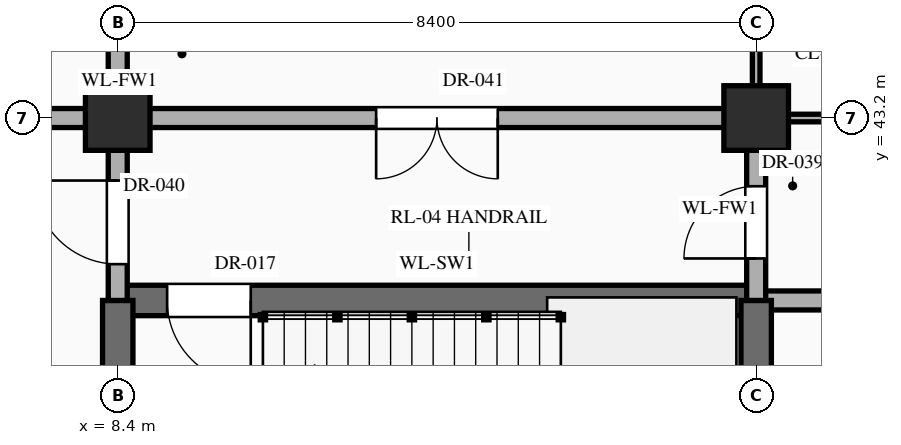
"""IFC4 building model, lengths in metres.
Left out: names, types, materials, properties, quantities, classifications, styles, units other than length and angle.
Written with IfcOpenShell. Run it as: python <this file> out.ifc"""

import sys

from ifc_helpers import new_model, si_unit, direction, frame, frame_2d, origin, origin_2d, place, context, subcontext, project, spatial, rectangle, extrude, element, fill, save


model = new_model("IFC4")
c1 = context("Model", 3, precision=1e-05, world=origin(), true_north=direction((0.0, 1.0)))
c2 = subcontext(c1, "Body", "Model", "MODEL_VIEW")
j1 = project(units=[si_unit("LENGTHUNIT", "METRE"), si_unit("PLANEANGLEUNIT", "RADIAN")], contexts=[c1])
p1 = place(None, origin())
s1 = spatial("IfcSite", under=j1, at=p1, CompositionType="ELEMENT")
p2 = place(p1, origin())
s2 = spatial("IfcBuilding", under=s1, at=p2, CompositionType="ELEMENT")
p3 = place(p2, frame((0.0, 0.0, -10.2)))
s3 = spatial("IfcBuildingStorey", under=s2, at=p3, CompositionType="ELEMENT", Elevation=-10.2)
for number, where, z_axis, x_axis in (
    (1, (8.4, 43.2, 0.0), (0.0, 0.0, 1.0), (1.0, 0.0, 0.0)),
    (2, (16.8, 43.2, 0.0), (0.0, 0.0, 1.0), (1.0, 0.0, 0.0)),
):
    element("IfcColumn", number, at=place(p3, frame(where, z_axis=z_axis, x_axis=x_axis)), inside=s3, PredefinedType="COLUMN", context=c2, shape_type="SweptSolid", body=[
        extrude(rectangle(XDim=0.85, YDim=0.85, at=origin_2d()), origin(), (0.0, 0.0, 1.0), 4.8),
    ])
p4 = place(p3, frame((8.4, 40.8, 0.0), z_axis=(0.0, 0.0, 1.0), x_axis=(1.0, 0.0, 0.0)))
e3 = element("IfcWall", 3, at=p4, inside=s3, PredefinedType="SHEAR", context=c2, shape_type="SweptSolid", body=[
    extrude(rectangle(XDim=8.4, YDim=0.4, at=frame_2d((4.2, 0.0))), origin(), (0.0, 0.0, 1.0), 4.48),
])
p5 = place(p4, frame((0.65, 0.0, 0.0)))
e4 = element("IfcOpeningElement", 4, at=p5, cuts=e3, PredefinedType="OPENING", context=c2, shape_type="SweptSolid", body=[
    extrude(rectangle(XDim=1.1, YDim=2.2, at=frame_2d((0.55, 1.1))), frame((0.0, 0.212, 0.0), z_axis=(0.0, -1.0, 0.0), x_axis=(1.0, 0.0, 0.0)), (0.0, 0.0, 1.0), 0.424),
])
p6 = place(p3, frame((16.8, 40.8, 0.0), z_axis=(0.0, 0.0, 1.0), x_axis=(1.0, 0.0, 0.0)))
e5 = element("IfcWall", 5, at=p6, inside=s3, PredefinedType="STANDARD", context=c2, shape_type="SweptSolid", body=[
    extrude(rectangle(XDim=61.6, YDim=0.25, at=frame_2d((30.8, 0.0))), origin(), (0.0, 0.0, 1.0), 4.48),
])
p7 = place(p6, frame((30.25, 0.0, 0.0)))
e6 = element("IfcOpeningElement", 6, at=p7, cuts=e5, PredefinedType="OPENING", context=c2, shape_type="SweptSolid", body=[
    extrude(rectangle(XDim=1.1, YDim=2.2, at=frame_2d((0.55, 1.1))), frame((0.0, 0.137, 0.0), z_axis=(0.0, -1.0, 0.0), x_axis=(1.0, 0.0, 0.0)), (0.0, 0.0, 1.0), 0.274),
])
p8 = place(p3, frame((0.04, 43.2, 0.0), z_axis=(0.0, 0.0, 1.0), x_axis=(1.0, 0.0, 0.0)))
e7 = element("IfcWall", 7, at=p8, inside=s3, PredefinedType="STANDARD", context=c2, shape_type="SweptSolid", body=[
    extrude(rectangle(XDim=16.76, YDim=0.25, at=frame_2d((8.38, 0.0))), origin(), (0.0, 0.0, 1.0), 3.63),
])
p9 = place(p8, frame((11.76, 0.0, 0.0)))
e8 = element("IfcOpeningElement", 8, at=p9, cuts=e7, PredefinedType="OPENING", context=c2, shape_type="SweptSolid", body=[
    extrude(rectangle(XDim=1.6, YDim=2.3, at=frame_2d((0.8, 1.15))), frame((0.0, 0.137, 0.0), z_axis=(0.0, -1.0, 0.0), x_axis=(1.0, 0.0, 0.0)), (0.0, 0.0, 1.0), 0.274),
])
p10 = place(p3, frame((16.8, 43.2, 0.0), z_axis=(0.0, 0.0, 1.0), x_axis=(1.0, 0.0, 0.0)))
e9 = element("IfcWall", 9, at=p10, inside=s3, PredefinedType="STANDARD", context=c2, shape_type="SweptSolid", body=[
    extrude(rectangle(XDim=33.6, YDim=0.1, at=frame_2d((16.8, 0.0))), origin(), (0.0, 0.0, 1.0), 3.63),
])
p11 = place(p10, frame((12.14, 0.0, 0.0)))
e10 = element("IfcOpeningElement", 10, at=p11, cuts=e9, PredefinedType="OPENING", context=c2, shape_type="SweptSolid", body=[
    extrude(rectangle(XDim=0.92, YDim=2.15, at=frame_2d((0.46, 1.075))), frame((0.0, 0.062, 0.0), z_axis=(0.0, -1.0, 0.0), x_axis=(1.0, 0.0, 0.0)), (0.0, 0.0, 1.0), 0.124),
])
p12 = place(p3, frame((8.4, 36.0, 0.0), z_axis=(0.0, 0.0, 1.0), x_axis=(0.0, 1.0, 0.0)))
e11 = element("IfcWall", 11, at=p12, inside=s3, PredefinedType="SHEAR", context=c2, shape_type="SweptSolid", body=[
    extrude(rectangle(XDim=4.8, YDim=0.4, at=frame_2d((2.4, 0.0))), origin(), (0.0, 0.0, 1.0), 4.48),
])
p13 = place(p3, frame((8.4, 40.8, 0.0), z_axis=(0.0, 0.0, 1.0), x_axis=(0.0, 1.0, 0.0)))
e12 = element("IfcWall", 12, at=p13, inside=s3, PredefinedType="STANDARD", context=c2, shape_type="SweptSolid", body=[
    extrude(rectangle(XDim=43.2, YDim=0.25, at=frame_2d((21.6, 0.0))), origin(), (0.0, 0.0, 1.0), 3.73),
])
p14 = place(p13, frame((0.478, 0.0, 0.0)))
e13 = element("IfcOpeningElement", 13, at=p14, cuts=e12, PredefinedType="OPENING", context=c2, shape_type="SweptSolid", body=[
    extrude(rectangle(XDim=1.1, YDim=2.2, at=frame_2d((0.55, 1.1))), frame((0.0, 0.137, 0.0), z_axis=(0.0, -1.0, 0.0), x_axis=(1.0, 0.0, 0.0)), (0.0, 0.0, 1.0), 0.274),
])
p15 = place(p13, frame((27.05, 0.0, 0.0)))
e14 = element("IfcOpeningElement", 14, at=p15, cuts=e12, PredefinedType="OPENING", context=c2, shape_type="SweptSolid", body=[
    extrude(rectangle(XDim=1.1, YDim=2.2, at=frame_2d((0.55, 1.1))), frame((0.0, 0.137, 0.0), z_axis=(0.0, -1.0, 0.0), x_axis=(1.0, 0.0, 0.0)), (0.0, 0.0, 1.0), 0.274),
])
p16 = place(p3, frame((16.8, 36.0, 0.0), z_axis=(0.0, 0.0, 1.0), x_axis=(0.0, 1.0, 0.0)))
e15 = element("IfcWall", 15, at=p16, inside=s3, PredefinedType="SHEAR", context=c2, shape_type="SweptSolid", body=[
    extrude(rectangle(XDim=4.8, YDim=0.4, at=frame_2d((2.4, 0.0))), origin(), (0.0, 0.0, 1.0), 4.48),
])
p17 = place(p3, frame((16.8, 40.8, 0.0), z_axis=(0.0, 0.0, 1.0), x_axis=(0.0, 1.0, 0.0)))
e16 = element("IfcWall", 16, at=p17, inside=s3, PredefinedType="STANDARD", context=c2, shape_type="SweptSolid", body=[
    extrude(rectangle(XDim=2.4, YDim=0.25, at=frame_2d((1.2, 0.0))), origin(), (0.0, 0.0, 1.0), 3.73),
])
p18 = place(p17, frame((0.552, 0.0, 0.0)))
e17 = element("IfcOpeningElement", 17, at=p18, cuts=e16, PredefinedType="OPENING", context=c2, shape_type="SweptSolid", body=[
    extrude(rectangle(XDim=0.95, YDim=2.15, at=frame_2d((0.475, 1.075))), frame((0.0, 0.137, 0.0), z_axis=(0.0, -1.0, 0.0), x_axis=(1.0, 0.0, 0.0)), (0.0, 0.0, 1.0), 0.274),
])
p19 = place(p3, frame((16.8, 43.2, 0.0), z_axis=(0.0, 0.0, 1.0), x_axis=(0.0, 1.0, 0.0)))
e18 = element("IfcWall", 18, at=p19, inside=s3, PredefinedType="STANDARD", context=c2, shape_type="SweptSolid", body=[
    extrude(rectangle(XDim=36.0, YDim=0.1, at=frame_2d((18.0, 0.0))), origin(), (0.0, 0.0, 1.0), 3.73),
])
p20 = place(p19, frame((24.62, 0.0, 0.0)))
e19 = element("IfcOpeningElement", 19, at=p20, cuts=e18, PredefinedType="OPENING", context=c2, shape_type="SweptSolid", body=[
    extrude(rectangle(XDim=1.16, YDim=2.3, at=frame_2d((0.58, 1.15))), frame((0.0, 0.062, 0.0), z_axis=(0.0, -1.0, 0.0), x_axis=(1.0, 0.0, 0.0)), (0.0, 0.0, 1.0), 0.124),
])
p21 = place(p5, frame((1.1, 0.0, 0.0), z_axis=(0.0, 0.0, 1.0), x_axis=(-1.0, 0.0, 0.0)))
e20 = element("IfcDoor", 20, at=p21, inside=s3, OperationType="SINGLE_SWING_LEFT", PredefinedType="DOOR", context=c2, shape_type="SweptSolid", body=[
    extrude(rectangle(XDim=1.1, YDim=2.2, at=frame_2d((0.55, 1.1))), frame((0.0, 0.025, 0.0), z_axis=(0.0, -1.0, 0.0), x_axis=(1.0, 0.0, 0.0)), (0.0, 0.0, 1.0), 0.05),
])
fill(e4, e20)
p22 = place(p18, origin())
e21 = element("IfcDoor", 21, at=p22, inside=s3, OperationType="SINGLE_SWING_LEFT", PredefinedType="DOOR", context=c2, shape_type="SweptSolid", body=[
    extrude(rectangle(XDim=0.95, YDim=2.15, at=frame_2d((0.475, 1.075))), frame((0.0, 0.025, 0.0), z_axis=(0.0, -1.0, 0.0), x_axis=(1.0, 0.0, 0.0)), (0.0, 0.0, 1.0), 0.05),
])
fill(e17, e21)
p23 = place(p14, origin())
e22 = element("IfcDoor", 22, at=p23, inside=s3, OperationType="SINGLE_SWING_RIGHT", PredefinedType="DOOR", context=c2, shape_type="SweptSolid", body=[
    extrude(rectangle(XDim=1.1, YDim=2.2, at=frame_2d((0.55, 1.1))), frame((0.0, 0.025, 0.0), z_axis=(0.0, -1.0, 0.0), x_axis=(1.0, 0.0, 0.0)), (0.0, 0.0, 1.0), 0.05),
])
fill(e13, e22)
p24 = place(p9, frame((1.6, 0.0, 0.0), z_axis=(0.0, 0.0, 1.0), x_axis=(-1.0, 0.0, 0.0)))
e23 = element("IfcDoor", 23, at=p24, inside=s3, OperationType="DOUBLE_DOOR_SINGLE_SWING", PredefinedType="DOOR", context=c2, shape_type="SweptSolid", body=[
    extrude(rectangle(XDim=1.6, YDim=2.3, at=frame_2d((0.8, 1.15))), frame((0.0, 0.025, 0.0), z_axis=(0.0, -1.0, 0.0), x_axis=(1.0, 0.0, 0.0)), (0.0, 0.0, 1.0), 0.05),
])
fill(e8, e23)
save(model, sys.argv[1])
